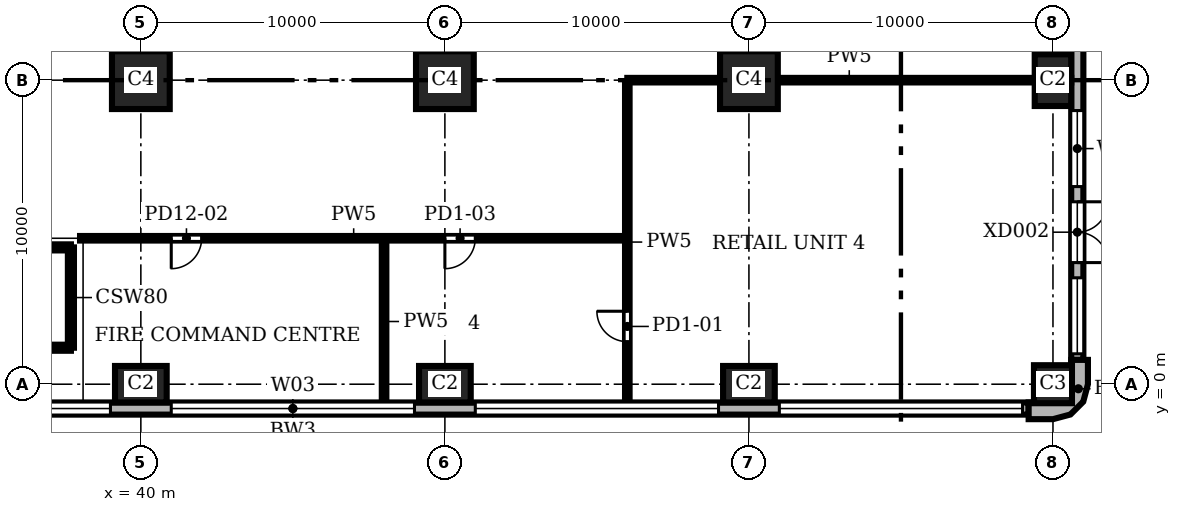
"""IFC4 building model, lengths in metres.
Left out: names, types, materials, properties, quantities, classifications, styles, units other than length and angle.
Written with IfcOpenShell. Run it as: python <this file> out.ifc"""

import sys

from ifc_helpers import new_model, si_unit, direction, frame, frame_2d, origin, origin_2d, place, context, subcontext, project, spatial, polyline, rectangle, outline, extrude, element, fill, save


model = new_model("IFC4")
c1 = context("Model", 3, precision=1e-05, world=origin(), true_north=direction((0.0, 1.0)))
c2 = subcontext(c1, "Body", "Model", "MODEL_VIEW")
j1 = project(units=[si_unit("LENGTHUNIT", "METRE"), si_unit("PLANEANGLEUNIT", "RADIAN")], contexts=[c1])
p1 = place(None, origin())
s1 = spatial("IfcSite", under=j1, at=p1, CompositionType="ELEMENT")
p2 = place(p1, origin())
s2 = spatial("IfcBuilding", under=s1, at=p2, CompositionType="ELEMENT")
p3 = place(p2, origin())
s3 = spatial("IfcBuildingStorey", under=s2, at=p3, CompositionType="ELEMENT", Elevation=0.0)
for number, where, z_axis, x_axis in (
    (1, (40.0, 0.0, 0.0), (0.0, 0.0, 1.0), (1.0, 0.0, 0.0)),
    (2, (50.0, 0.0, 0.0), (0.0, 0.0, 1.0), (1.0, 0.0, 0.0)),
    (3, (60.0, 0.0, 0.0), (0.0, 0.0, 1.0), (1.0, 0.0, 0.0)),
):
    element("IfcColumn", number, at=place(p3, frame(where, z_axis=z_axis, x_axis=x_axis)), inside=s3, PredefinedType="COLUMN", context=c2, shape_type="SweptSolid", body=[
        extrude(rectangle(XDim=1.7, YDim=1.2, at=origin_2d()), origin(), (0.0, 0.0, 1.0), 6.0),
    ])
p4 = place(p3, frame((70.0, 0.0, 0.0), z_axis=(0.0, 0.0, 1.0), x_axis=(1.0, 0.0, 0.0)))
e4 = element("IfcColumn", 4, at=p4, inside=s3, PredefinedType="COLUMN", context=c2, shape_type="SweptSolid", body=[
    extrude(rectangle(XDim=1.25, YDim=1.25, at=origin_2d()), origin(), (0.0, 0.0, 1.0), 6.0),
])
p5 = place(p3, frame((70.0, 10.0, 0.0), z_axis=(0.0, 0.0, 1.0), x_axis=(0.0, 1.0, 0.0)))
e5 = element("IfcColumn", 5, at=p5, inside=s3, PredefinedType="COLUMN", context=c2, shape_type="SweptSolid", body=[
    extrude(rectangle(XDim=1.7, YDim=1.2, at=origin_2d()), origin(), (0.0, 0.0, 1.0), 6.0),
])
for number, where, z_axis, x_axis in (
    (6, (40.0, 10.0, 0.0), (0.0, 0.0, 1.0), (1.0, 0.0, 0.0)),
    (7, (50.0, 10.0, 0.0), (0.0, 0.0, 1.0), (1.0, 0.0, 0.0)),
    (8, (60.0, 10.0, 0.0), (0.0, 0.0, 1.0), (1.0, 0.0, 0.0)),
):
    element("IfcColumn", number, at=place(p3, frame(where, z_axis=z_axis, x_axis=x_axis)), inside=s3, PredefinedType="COLUMN", context=c2, shape_type="SweptSolid", body=[
        extrude(rectangle(XDim=1.9, YDim=1.9, at=origin_2d()), origin(), (0.0, 0.0, 1.0), 6.0),
    ])
p6 = place(p3, origin())
e9 = element("IfcWall", 9, at=p6, inside=s3, PredefinedType="SOLIDWALL", context=c2, shape_type="SweptSolid", body=[
    extrude(outline(polyline([(69.2, -1.0), (69.2, -1.15), (70.0, -1.15), (70.575, -0.996), (70.996, -0.575), (71.15, 0.0), (71.15, 0.8), (71.0, 0.8), (70.6, 0.8), (70.6, 0.0), (70.52, -0.3), (70.3, -0.52), (70.0, -0.6), (69.2, -0.6), (69.2, -1.0)])), origin(), (0.0, 0.0, 1.0), 6.0),
])
p7 = place(p3, frame((20.8, -0.8, 0.0), z_axis=(0.0, 0.0, 1.0), x_axis=(1.0, 0.0, 0.0)))
e10 = element("IfcWall", 10, at=p7, inside=s3, PredefinedType="SOLIDWALL", context=c2, shape_type="SweptSolid", body=[
    extrude(rectangle(XDim=48.4, YDim=0.4, at=frame_2d((24.2, 0.0))), origin(), (0.0, 0.0, 1.0), 6.0),
])
p8 = place(p7, frame((3.3, 0.0, 0.0)))
e11 = element("IfcOpeningElement", 11, at=p8, cuts=e10, PredefinedType="OPENING", context=c2, shape_type="SweptSolid", body=[
    extrude(rectangle(XDim=1.8, YDim=2.4, at=frame_2d((0.9, 1.2))), frame((0.0, 0.21, 0.0), z_axis=(0.0, -1.0, 0.0), x_axis=(1.0, 0.0, 0.0)), (0.0, 0.0, 1.0), 0.42),
])
p9 = place(p7, frame((10.2, 0.0, 0.9)))
e12 = element("IfcOpeningElement", 12, at=p9, cuts=e10, PredefinedType="OPENING", context=c2, shape_type="SweptSolid", body=[
    extrude(rectangle(XDim=8.0, YDim=4.4, at=frame_2d((4.0, 2.2))), frame((0.0, 0.21, 0.0), z_axis=(0.0, -1.0, 0.0), x_axis=(1.0, 0.0, 0.0)), (0.0, 0.0, 1.0), 0.42),
])
p10 = place(p7, frame((20.2, 0.0, 0.9)))
e13 = element("IfcOpeningElement", 13, at=p10, cuts=e10, PredefinedType="OPENING", context=c2, shape_type="SweptSolid", body=[
    extrude(rectangle(XDim=8.0, YDim=4.4, at=frame_2d((4.0, 2.2))), frame((0.0, 0.21, 0.0), z_axis=(0.0, -1.0, 0.0), x_axis=(1.0, 0.0, 0.0)), (0.0, 0.0, 1.0), 0.42),
])
p11 = place(p7, frame((30.2, 0.0, 0.9)))
e14 = element("IfcOpeningElement", 14, at=p11, cuts=e10, PredefinedType="OPENING", context=c2, shape_type="SweptSolid", body=[
    extrude(rectangle(XDim=8.0, YDim=4.4, at=frame_2d((4.0, 2.2))), frame((0.0, 0.21, 0.0), z_axis=(0.0, -1.0, 0.0), x_axis=(1.0, 0.0, 0.0)), (0.0, 0.0, 1.0), 0.42),
])
p12 = place(p7, frame((40.2, 0.0, 0.9)))
e15 = element("IfcOpeningElement", 15, at=p12, cuts=e10, PredefinedType="OPENING", context=c2, shape_type="SweptSolid", body=[
    extrude(rectangle(XDim=8.0, YDim=4.4, at=frame_2d((4.0, 2.2))), frame((0.0, 0.21, 0.0), z_axis=(0.0, -1.0, 0.0), x_axis=(1.0, 0.0, 0.0)), (0.0, 0.0, 1.0), 0.42),
])
p13 = place(p3, frame((70.8, 0.8, 0.0), z_axis=(0.0, 0.0, 1.0), x_axis=(0.0, 1.0, 0.0)))
e16 = element("IfcWall", 16, at=p13, inside=s3, PredefinedType="SOLIDWALL", context=c2, shape_type="SweptSolid", body=[
    extrude(rectangle(XDim=28.4, YDim=0.4, at=frame_2d((14.2, 0.0))), origin(), (0.0, 0.0, 1.0), 6.0),
])
p14 = place(p13, frame((0.2, 0.0, 0.3)))
e17 = element("IfcOpeningElement", 17, at=p14, cuts=e16, PredefinedType="OPENING", context=c2, shape_type="SweptSolid", body=[
    extrude(rectangle(XDim=2.5, YDim=4.2, at=frame_2d((1.25, 2.1))), frame((0.0, 0.21, 0.0), z_axis=(0.0, -1.0, 0.0), x_axis=(1.0, 0.0, 0.0)), (0.0, 0.0, 1.0), 0.42),
])
p15 = place(p13, frame((3.2, 0.0, 0.0)))
e18 = element("IfcOpeningElement", 18, at=p15, cuts=e16, PredefinedType="OPENING", context=c2, shape_type="SweptSolid", body=[
    extrude(rectangle(XDim=2.0, YDim=2.7, at=frame_2d((1.0, 1.35))), frame((0.0, 0.21, 0.0), z_axis=(0.0, -1.0, 0.0), x_axis=(1.0, 0.0, 0.0)), (0.0, 0.0, 1.0), 0.42),
])
p16 = place(p13, frame((5.7, 0.0, 0.3)))
e19 = element("IfcOpeningElement", 19, at=p16, cuts=e16, PredefinedType="OPENING", context=c2, shape_type="SweptSolid", body=[
    extrude(rectangle(XDim=2.5, YDim=4.2, at=frame_2d((1.25, 2.1))), frame((0.0, 0.21, 0.0), z_axis=(0.0, -1.0, 0.0), x_axis=(1.0, 0.0, 0.0)), (0.0, 0.0, 1.0), 0.42),
])
p17 = place(p13, frame((10.2, 0.0, 0.3)))
e20 = element("IfcOpeningElement", 20, at=p17, cuts=e16, PredefinedType="OPENING", context=c2, shape_type="SweptSolid", body=[
    extrude(rectangle(XDim=2.3, YDim=4.2, at=frame_2d((1.15, 2.1))), frame((0.0, 0.21, 0.0), z_axis=(0.0, -1.0, 0.0), x_axis=(1.0, 0.0, 0.0)), (0.0, 0.0, 1.0), 0.42),
])
p18 = place(p13, frame((13.0, 0.0, 0.0)))
e21 = element("IfcOpeningElement", 21, at=p18, cuts=e16, PredefinedType="OPENING", context=c2, shape_type="SweptSolid", body=[
    extrude(rectangle(XDim=2.4, YDim=2.7, at=frame_2d((1.2, 1.35))), frame((0.0, 0.21, 0.0), z_axis=(0.0, -1.0, 0.0), x_axis=(1.0, 0.0, 0.0)), (0.0, 0.0, 1.0), 0.42),
])
p19 = place(p13, frame((15.9, 0.0, 0.3)))
e22 = element("IfcOpeningElement", 22, at=p19, cuts=e16, PredefinedType="OPENING", context=c2, shape_type="SweptSolid", body=[
    extrude(rectangle(XDim=2.3, YDim=4.2, at=frame_2d((1.15, 2.1))), frame((0.0, 0.21, 0.0), z_axis=(0.0, -1.0, 0.0), x_axis=(1.0, 0.0, 0.0)), (0.0, 0.0, 1.0), 0.42),
])
p20 = place(p13, frame((20.2, 0.0, 0.3)))
e23 = element("IfcOpeningElement", 23, at=p20, cuts=e16, PredefinedType="OPENING", context=c2, shape_type="SweptSolid", body=[
    extrude(rectangle(XDim=2.5, YDim=4.2, at=frame_2d((1.25, 2.1))), frame((0.0, 0.21, 0.0), z_axis=(0.0, -1.0, 0.0), x_axis=(1.0, 0.0, 0.0)), (0.0, 0.0, 1.0), 0.42),
])
p21 = place(p13, frame((23.2, 0.0, 0.0)))
e24 = element("IfcOpeningElement", 24, at=p21, cuts=e16, PredefinedType="OPENING", context=c2, shape_type="SweptSolid", body=[
    extrude(rectangle(XDim=2.0, YDim=2.7, at=frame_2d((1.0, 1.35))), frame((0.0, 0.21, 0.0), z_axis=(0.0, -1.0, 0.0), x_axis=(1.0, 0.0, 0.0)), (0.0, 0.0, 1.0), 0.42),
])
p22 = place(p13, frame((25.7, 0.0, 0.3)))
e25 = element("IfcOpeningElement", 25, at=p22, cuts=e16, PredefinedType="OPENING", context=c2, shape_type="SweptSolid", body=[
    extrude(rectangle(XDim=2.5, YDim=4.2, at=frame_2d((1.25, 2.1))), frame((0.0, 0.21, 0.0), z_axis=(0.0, -1.0, 0.0), x_axis=(1.0, 0.0, 0.0)), (0.0, 0.0, 1.0), 0.42),
])
p23 = place(p3, frame((31.2, 1.2, 0.0), z_axis=(0.0, 0.0, 1.0), x_axis=(1.0, 0.0, 0.0)))
e26 = element("IfcWall", 26, at=p23, inside=s3, PredefinedType="SHEAR", context=c2, shape_type="SweptSolid", body=[
    extrude(rectangle(XDim=6.5, YDim=0.2, at=frame_2d((3.25, 0.0))), origin(), (0.0, 0.0, 1.0), 5.55),
])
p24 = place(p3, frame((31.2, 4.5, 0.0), z_axis=(0.0, 0.0, 1.0), x_axis=(1.0, 0.0, 0.0)))
e27 = element("IfcWall", 27, at=p24, inside=s3, PredefinedType="SHEAR", context=c2, shape_type="SweptSolid", body=[
    extrude(rectangle(XDim=6.5, YDim=0.2, at=frame_2d((3.25, 0.0))), origin(), (0.0, 0.0, 1.0), 5.55),
])
p25 = place(p24, frame((0.375, 0.0, 0.0)))
e28 = element("IfcOpeningElement", 28, at=p25, cuts=e27, PredefinedType="OPENING", context=c2, shape_type="SweptSolid", body=[
    extrude(rectangle(XDim=1.0, YDim=2.1, at=frame_2d((0.5, 1.05))), frame((0.0, 0.11, 0.0), z_axis=(0.0, -1.0, 0.0), x_axis=(1.0, 0.0, 0.0)), (0.0, 0.0, 1.0), 0.22),
])
p26 = place(p3, frame((37.7, 1.2, 0.0), z_axis=(0.0, 0.0, 1.0), x_axis=(0.0, 1.0, 0.0)))
e29 = element("IfcWall", 29, at=p26, inside=s3, PredefinedType="SHEAR", context=c2, shape_type="SweptSolid", body=[
    extrude(rectangle(XDim=3.3, YDim=0.2, at=frame_2d((1.65, 0.0))), origin(), (0.0, 0.0, 1.0), 5.55),
])
p27 = place(p3, frame((56.0, -0.6, 0.0), z_axis=(0.0, 0.0, 1.0), x_axis=(0.0, 1.0, 0.0)))
e30 = element("IfcWall", 30, at=p27, inside=s3, PredefinedType="PARTITIONING", context=c2, shape_type="SweptSolid", body=[
    extrude(rectangle(XDim=10.55, YDim=0.15, at=frame_2d((5.275, 0.0))), origin(), (0.0, 0.0, 1.0), 5.55),
])
p28 = place(p27, frame((2.0, 0.0, 0.0)))
e31 = element("IfcOpeningElement", 31, at=p28, cuts=e30, PredefinedType="OPENING", context=c2, shape_type="SweptSolid", body=[
    extrude(rectangle(XDim=1.0, YDim=2.1, at=frame_2d((0.5, 1.05))), frame((0.0, 0.085, 0.0), z_axis=(0.0, -1.0, 0.0), x_axis=(1.0, 0.0, 0.0)), (0.0, 0.0, 1.0), 0.17),
])
p29 = place(p3, frame((56.0, 10.0, 0.0), z_axis=(0.0, 0.0, 1.0), x_axis=(1.0, 0.0, 0.0)))
e32 = element("IfcWall", 32, at=p29, inside=s3, PredefinedType="PARTITIONING", context=c2, shape_type="SweptSolid", body=[
    extrude(rectangle(XDim=14.6, YDim=0.15, at=frame_2d((7.3, 0.0))), origin(), (0.0, 0.0, 1.0), 5.55),
])
p30 = place(p3, frame((38.0, 4.8, 0.0), z_axis=(0.0, 0.0, 1.0), x_axis=(1.0, 0.0, 0.0)))
e33 = element("IfcWall", 33, at=p30, inside=s3, PredefinedType="PARTITIONING", context=c2, shape_type="SweptSolid", body=[
    extrude(rectangle(XDim=18.0, YDim=0.15, at=frame_2d((9.0, 0.0))), origin(), (0.0, 0.0, 1.0), 5.55),
])
p31 = place(p30, frame((3.0, 0.0, 0.0)))
e34 = element("IfcOpeningElement", 34, at=p31, cuts=e33, PredefinedType="OPENING", context=c2, shape_type="SweptSolid", body=[
    extrude(rectangle(XDim=1.0, YDim=2.1, at=frame_2d((0.5, 1.05))), frame((0.0, 0.085, 0.0), z_axis=(0.0, -1.0, 0.0), x_axis=(1.0, 0.0, 0.0)), (0.0, 0.0, 1.0), 0.17),
])
p32 = place(p30, frame((12.0, 0.0, 0.0)))
e35 = element("IfcOpeningElement", 35, at=p32, cuts=e33, PredefinedType="OPENING", context=c2, shape_type="SweptSolid", body=[
    extrude(rectangle(XDim=1.0, YDim=2.1, at=frame_2d((0.5, 1.05))), frame((0.0, 0.085, 0.0), z_axis=(0.0, -1.0, 0.0), x_axis=(1.0, 0.0, 0.0)), (0.0, 0.0, 1.0), 0.17),
])
p33 = place(p3, frame((48.0, -0.6, 0.0), z_axis=(0.0, 0.0, 1.0), x_axis=(0.0, 1.0, 0.0)))
e36 = element("IfcWall", 36, at=p33, inside=s3, PredefinedType="PARTITIONING", context=c2, shape_type="SweptSolid", body=[
    extrude(rectangle(XDim=5.325, YDim=0.15, at=frame_2d((2.663, 0.0))), origin(), (0.0, 0.0, 1.0), 5.55),
])
p34 = place(p9, origin())
e37 = element("IfcWindow", 37, at=p34, inside=s3, PartitioningType="SINGLE_PANEL", PredefinedType="WINDOW", context=c2, shape_type="SweptSolid", body=[
    extrude(rectangle(XDim=8.0, YDim=4.4, at=frame_2d((4.0, 2.2))), frame((0.0, 0.16, 0.0), z_axis=(0.0, -1.0, 0.0), x_axis=(1.0, 0.0, 0.0)), (0.0, 0.0, 1.0), 0.06),
])
fill(e12, e37)
p35 = place(p10, origin())
e38 = element("IfcWindow", 38, at=p35, inside=s3, PartitioningType="SINGLE_PANEL", PredefinedType="WINDOW", context=c2, shape_type="SweptSolid", body=[
    extrude(rectangle(XDim=8.0, YDim=4.4, at=frame_2d((4.0, 2.2))), frame((0.0, 0.16, 0.0), z_axis=(0.0, -1.0, 0.0), x_axis=(1.0, 0.0, 0.0)), (0.0, 0.0, 1.0), 0.06),
])
fill(e13, e38)
p36 = place(p11, origin())
e39 = element("IfcWindow", 39, at=p36, inside=s3, PartitioningType="SINGLE_PANEL", PredefinedType="WINDOW", context=c2, shape_type="SweptSolid", body=[
    extrude(rectangle(XDim=8.0, YDim=4.4, at=frame_2d((4.0, 2.2))), frame((0.0, 0.16, 0.0), z_axis=(0.0, -1.0, 0.0), x_axis=(1.0, 0.0, 0.0)), (0.0, 0.0, 1.0), 0.06),
])
fill(e14, e39)
p37 = place(p12, origin())
e40 = element("IfcWindow", 40, at=p37, inside=s3, PartitioningType="SINGLE_PANEL", PredefinedType="WINDOW", context=c2, shape_type="SweptSolid", body=[
    extrude(rectangle(XDim=8.0, YDim=4.4, at=frame_2d((4.0, 2.2))), frame((0.0, 0.16, 0.0), z_axis=(0.0, -1.0, 0.0), x_axis=(1.0, 0.0, 0.0)), (0.0, 0.0, 1.0), 0.06),
])
fill(e15, e40)
p38 = place(p14, origin())
e41 = element("IfcWindow", 41, at=p38, inside=s3, PartitioningType="SINGLE_PANEL", PredefinedType="WINDOW", context=c2, shape_type="SweptSolid", body=[
    extrude(rectangle(XDim=2.5, YDim=4.2, at=frame_2d((1.25, 2.1))), frame((0.0, 0.16, 0.0), z_axis=(0.0, -1.0, 0.0), x_axis=(1.0, 0.0, 0.0)), (0.0, 0.0, 1.0), 0.06),
])
fill(e17, e41)
p39 = place(p15, frame((2.0, 0.0, 0.0), z_axis=(0.0, 0.0, 1.0), x_axis=(-1.0, 0.0, 0.0)))
e42 = element("IfcDoor", 42, at=p39, inside=s3, OperationType="DOUBLE_DOOR_DOUBLE_SWING", PredefinedType="DOOR", context=c2, shape_type="SweptSolid", body=[
    extrude(rectangle(XDim=2.0, YDim=2.7, at=frame_2d((1.0, 1.35))), frame((0.0, 0.025, 0.0), z_axis=(0.0, -1.0, 0.0), x_axis=(1.0, 0.0, 0.0)), (0.0, 0.0, 1.0), 0.05),
])
fill(e18, e42)
p40 = place(p16, origin())
e43 = element("IfcWindow", 43, at=p40, inside=s3, PartitioningType="SINGLE_PANEL", PredefinedType="WINDOW", context=c2, shape_type="SweptSolid", body=[
    extrude(rectangle(XDim=2.5, YDim=4.2, at=frame_2d((1.25, 2.1))), frame((0.0, 0.16, 0.0), z_axis=(0.0, -1.0, 0.0), x_axis=(1.0, 0.0, 0.0)), (0.0, 0.0, 1.0), 0.06),
])
fill(e19, e43)
p41 = place(p28, origin())
e44 = element("IfcDoor", 44, at=p41, inside=s3, OperationType="SINGLE_SWING_RIGHT", PredefinedType="DOOR", context=c2, shape_type="SweptSolid", body=[
    extrude(rectangle(XDim=1.0, YDim=2.1, at=frame_2d((0.5, 1.05))), frame((0.0, 0.025, 0.0), z_axis=(0.0, -1.0, 0.0), x_axis=(1.0, 0.0, 0.0)), (0.0, 0.0, 1.0), 0.05),
])
fill(e31, e44)
p42 = place(p31, frame((1.0, 0.0, 0.0), z_axis=(0.0, 0.0, 1.0), x_axis=(-1.0, 0.0, 0.0)))
e45 = element("IfcDoor", 45, at=p42, inside=s3, OperationType="SINGLE_SWING_RIGHT", PredefinedType="DOOR", context=c2, shape_type="SweptSolid", body=[
    extrude(rectangle(XDim=1.0, YDim=2.1, at=frame_2d((0.5, 1.05))), frame((0.0, 0.025, 0.0), z_axis=(0.0, -1.0, 0.0), x_axis=(1.0, 0.0, 0.0)), (0.0, 0.0, 1.0), 0.05),
])
fill(e34, e45)
p43 = place(p32, frame((1.0, 0.0, 0.0), z_axis=(0.0, 0.0, 1.0), x_axis=(-1.0, 0.0, 0.0)))
e46 = element("IfcDoor", 46, at=p43, inside=s3, OperationType="SINGLE_SWING_RIGHT", PredefinedType="DOOR", context=c2, shape_type="SweptSolid", body=[
    extrude(rectangle(XDim=1.0, YDim=2.1, at=frame_2d((0.5, 1.05))), frame((0.0, 0.025, 0.0), z_axis=(0.0, -1.0, 0.0), x_axis=(1.0, 0.0, 0.0)), (0.0, 0.0, 1.0), 0.05),
])
fill(e35, e46)
save(model, sys.argv[1])
